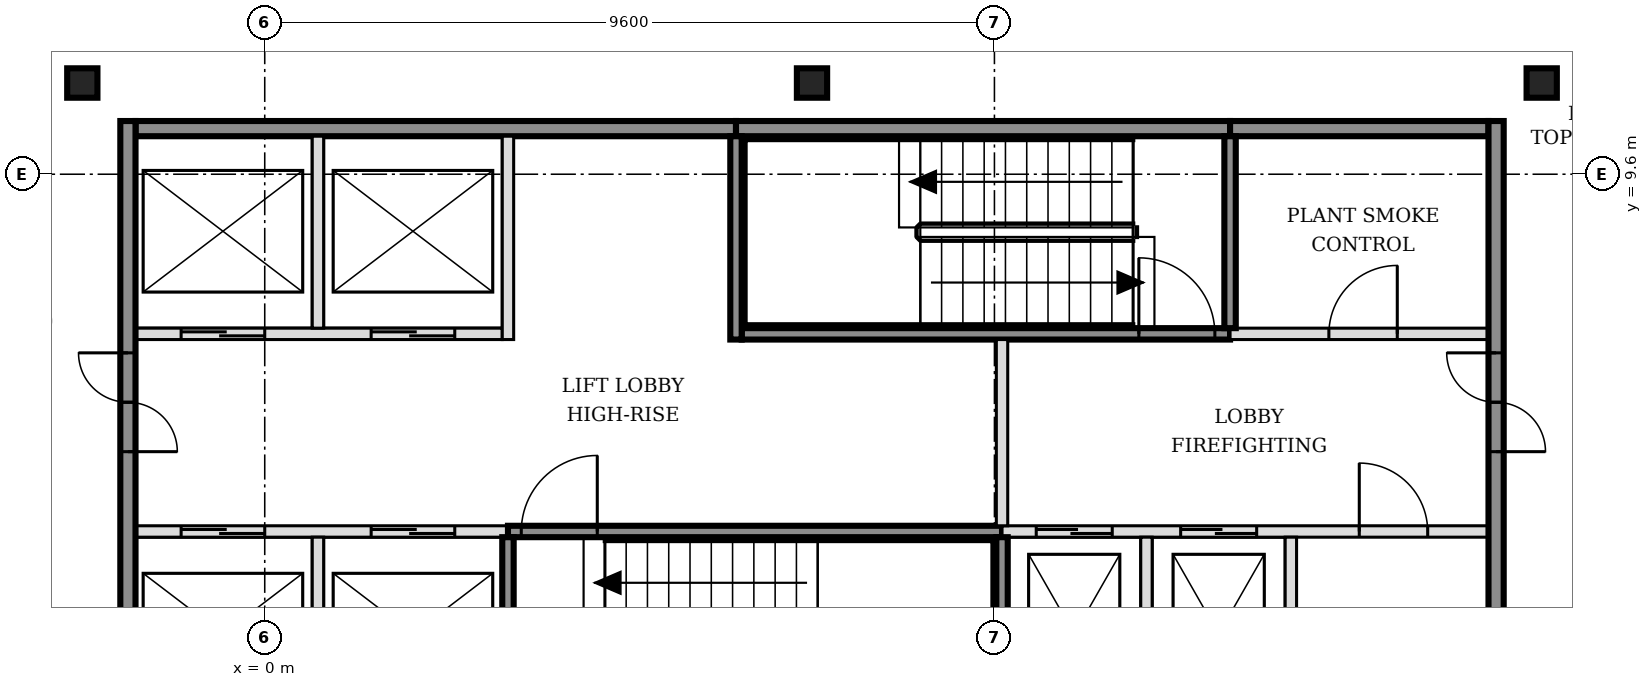
"""IFC4 building model, lengths in metres.
Left out: names, types, materials, properties, quantities, classifications, styles, units other than length and angle.
Written with IfcOpenShell. Run it as: python <this file> out.ifc"""

import sys

from ifc_helpers import new_model, si_unit, direction, frame, frame_2d, origin, origin_2d, place, context, subcontext, project, spatial, rectangle, i_section, extrude, element, fill, save


model = new_model("IFC4")
c1 = context("Model", 3, precision=1e-05, world=origin(), true_north=direction((0.0, 1.0)))
c2 = subcontext(c1, "Body", "Model", "MODEL_VIEW")
j1 = project(units=[si_unit("LENGTHUNIT", "METRE"), si_unit("PLANEANGLEUNIT", "RADIAN")], contexts=[c1])
p1 = place(None, origin())
s1 = spatial("IfcSite", under=j1, at=p1, CompositionType="ELEMENT")
p2 = place(p1, origin())
s2 = spatial("IfcBuilding", under=s1, at=p2, CompositionType="ELEMENT")
p3 = place(p2, frame((0.0, 0.0, 250.2)))
s3 = spatial("IfcBuildingStorey", under=s2, at=p3, CompositionType="ELEMENT", Elevation=250.2)
for number, where, z_axis, x_axis in (
    (1, (-2.4, 10.8, -0.15), (0.0, 0.0, 1.0), (1.0, 0.0, 0.0)),
    (2, (7.2, 10.8, -0.15), (0.0, 0.0, 1.0), (1.0, 0.0, 0.0)),
    (3, (16.8, 10.8, -0.15), (0.0, 0.0, 1.0), (1.0, 0.0, 0.0)),
):
    element("IfcColumn", number, at=place(p3, frame(where, z_axis=z_axis, x_axis=x_axis)), inside=s3, PredefinedType="COLUMN", context=c2, shape_type="SweptSolid", body=[
        extrude(i_section(OverallWidth=0.398, OverallDepth=0.387, WebThickness=0.021, FlangeThickness=0.033, FilletRadius=0.015, at=origin_2d()), origin(), (0.0, 0.0, 1.0), 3.6),
    ])
p4 = place(p3, frame((-1.7, 4.9, 0.0), z_axis=(0.0, 0.0, 1.0), x_axis=(1.0, 0.0, 0.0)))
e4 = element("IfcWall", 4, at=p4, inside=s3, PredefinedType="SOLIDWALL", context=c2, shape_type="SweptSolid", body=[
    extrude(rectangle(XDim=4.9, YDim=0.15, at=frame_2d((2.45, 0.0))), origin(), (0.0, 0.0, 1.0), 3.45),
])
p5 = place(p4, frame((0.6, 0.0, 0.0)))
e5 = element("IfcOpeningElement", 5, at=p5, cuts=e4, PredefinedType="OPENING", context=c2, shape_type="SweptSolid", body=[
    extrude(rectangle(XDim=1.1, YDim=2.1, at=frame_2d((0.55, 1.05))), frame((0.0, 0.085, 0.0), z_axis=(0.0, -1.0, 0.0), x_axis=(1.0, 0.0, 0.0)), (0.0, 0.0, 1.0), 0.17),
])
p6 = place(p4, frame((3.1, 0.0, 0.0)))
e6 = element("IfcOpeningElement", 6, at=p6, cuts=e4, PredefinedType="OPENING", context=c2, shape_type="SweptSolid", body=[
    extrude(rectangle(XDim=1.1, YDim=2.1, at=frame_2d((0.55, 1.05))), frame((0.0, 0.085, 0.0), z_axis=(0.0, -1.0, 0.0), x_axis=(1.0, 0.0, 0.0)), (0.0, 0.0, 1.0), 0.17),
])
p7 = place(p3, frame((3.2, 4.9, 0.0), z_axis=(0.0, 0.0, 1.0), x_axis=(1.0, 0.0, 0.0)))
e7 = element("IfcWall", 7, at=p7, inside=s3, PredefinedType="SOLIDWALL", context=c2, shape_type="SweptSolid", body=[
    extrude(rectangle(XDim=6.5, YDim=0.15, at=frame_2d((3.25, 0.0))), origin(), (0.0, 0.0, 1.0), 3.45),
])
p8 = place(p7, frame((0.175, 0.0, 0.0)))
e8 = element("IfcOpeningElement", 8, at=p8, cuts=e7, PredefinedType="OPENING", context=c2, shape_type="SweptSolid", body=[
    extrude(rectangle(XDim=1.0, YDim=2.1, at=frame_2d((0.5, 1.05))), frame((0.0, 0.085, 0.0), z_axis=(0.0, -1.0, 0.0), x_axis=(1.0, 0.0, 0.0)), (0.0, 0.0, 1.0), 0.17),
])
p9 = place(p3, frame((9.7, 4.9, 0.0), z_axis=(0.0, 0.0, 1.0), x_axis=(1.0, 0.0, 0.0)))
e9 = element("IfcWall", 9, at=p9, inside=s3, PredefinedType="SOLIDWALL", context=c2, shape_type="SweptSolid", body=[
    extrude(rectangle(XDim=6.4, YDim=0.15, at=frame_2d((3.2, 0.0))), origin(), (0.0, 0.0, 1.0), 3.45),
])
p10 = place(p9, frame((0.45, 0.0, 0.0)))
e10 = element("IfcOpeningElement", 10, at=p10, cuts=e9, PredefinedType="OPENING", context=c2, shape_type="SweptSolid", body=[
    extrude(rectangle(XDim=1.0, YDim=2.1, at=frame_2d((0.5, 1.05))), frame((0.0, 0.085, 0.0), z_axis=(0.0, -1.0, 0.0), x_axis=(1.0, 0.0, 0.0)), (0.0, 0.0, 1.0), 0.17),
])
p11 = place(p9, frame((2.35, 0.0, 0.0)))
e11 = element("IfcOpeningElement", 11, at=p11, cuts=e9, PredefinedType="OPENING", context=c2, shape_type="SweptSolid", body=[
    extrude(rectangle(XDim=1.0, YDim=2.1, at=frame_2d((0.5, 1.05))), frame((0.0, 0.085, 0.0), z_axis=(0.0, -1.0, 0.0), x_axis=(1.0, 0.0, 0.0)), (0.0, 0.0, 1.0), 0.17),
])
p12 = place(p9, frame((4.7, 0.0, 0.0)))
e12 = element("IfcOpeningElement", 12, at=p12, cuts=e9, PredefinedType="OPENING", context=c2, shape_type="SweptSolid", body=[
    extrude(rectangle(XDim=0.9, YDim=2.1, at=frame_2d((0.45, 1.05))), frame((0.0, 0.085, 0.0), z_axis=(0.0, -1.0, 0.0), x_axis=(1.0, 0.0, 0.0)), (0.0, 0.0, 1.0), 0.17),
])
p13 = place(p3, frame((-1.7, 7.5, 0.0), z_axis=(0.0, 0.0, 1.0), x_axis=(1.0, 0.0, 0.0)))
e13 = element("IfcWall", 13, at=p13, inside=s3, PredefinedType="SOLIDWALL", context=c2, shape_type="SweptSolid", body=[
    extrude(rectangle(XDim=4.825, YDim=0.15, at=frame_2d((2.413, 0.0))), origin(), (0.0, 0.0, 1.0), 3.45),
])
p14 = place(p13, frame((0.6, 0.0, 0.0)))
e14 = element("IfcOpeningElement", 14, at=p14, cuts=e13, PredefinedType="OPENING", context=c2, shape_type="SweptSolid", body=[
    extrude(rectangle(XDim=1.1, YDim=2.1, at=frame_2d((0.55, 1.05))), frame((0.0, 0.085, 0.0), z_axis=(0.0, -1.0, 0.0), x_axis=(1.0, 0.0, 0.0)), (0.0, 0.0, 1.0), 0.17),
])
p15 = place(p13, frame((3.1, 0.0, 0.0)))
e15 = element("IfcOpeningElement", 15, at=p15, cuts=e13, PredefinedType="OPENING", context=c2, shape_type="SweptSolid", body=[
    extrude(rectangle(XDim=1.1, YDim=2.1, at=frame_2d((0.55, 1.05))), frame((0.0, 0.085, 0.0), z_axis=(0.0, -1.0, 0.0), x_axis=(1.0, 0.0, 0.0)), (0.0, 0.0, 1.0), 0.17),
])
p16 = place(p3, frame((6.275, 7.5, 0.0), z_axis=(0.0, 0.0, 1.0), x_axis=(1.0, 0.0, 0.0)))
e16 = element("IfcWall", 16, at=p16, inside=s3, PredefinedType="SOLIDWALL", context=c2, shape_type="SweptSolid", body=[
    extrude(rectangle(XDim=6.425, YDim=0.15, at=frame_2d((3.212, 0.0))), origin(), (0.0, 0.0, 1.0), 3.45),
])
p17 = place(p16, frame((5.225, 0.0, 0.0)))
e17 = element("IfcOpeningElement", 17, at=p17, cuts=e16, PredefinedType="OPENING", context=c2, shape_type="SweptSolid", body=[
    extrude(rectangle(XDim=1.0, YDim=2.1, at=frame_2d((0.5, 1.05))), frame((0.0, 0.085, 0.0), z_axis=(0.0, -1.0, 0.0), x_axis=(1.0, 0.0, 0.0)), (0.0, 0.0, 1.0), 0.17),
])
p18 = place(p3, frame((12.7, 7.5, 0.0), z_axis=(0.0, 0.0, 1.0), x_axis=(1.0, 0.0, 0.0)))
e18 = element("IfcWall", 18, at=p18, inside=s3, PredefinedType="SOLIDWALL", context=c2, shape_type="SweptSolid", body=[
    extrude(rectangle(XDim=3.4, YDim=0.15, at=frame_2d((1.7, 0.0))), origin(), (0.0, 0.0, 1.0), 3.45),
])
p19 = place(p18, frame((1.3, 0.0, 0.0)))
e19 = element("IfcOpeningElement", 19, at=p19, cuts=e18, PredefinedType="OPENING", context=c2, shape_type="SweptSolid", body=[
    extrude(rectangle(XDim=0.9, YDim=2.1, at=frame_2d((0.45, 1.05))), frame((0.0, 0.085, 0.0), z_axis=(0.0, -1.0, 0.0), x_axis=(1.0, 0.0, 0.0)), (0.0, 0.0, 1.0), 0.17),
])
p20 = place(p3, frame((-1.7, 10.2, 0.0), z_axis=(0.0, 0.0, 1.0), x_axis=(1.0, 0.0, 0.0)))
e20 = element("IfcWall", 20, at=p20, inside=s3, PredefinedType="SOLIDWALL", context=c2, shape_type="SweptSolid", body=[
    extrude(rectangle(XDim=7.9, YDim=0.2, at=frame_2d((3.95, 0.0))), origin(), (0.0, 0.0, 1.0), 3.45),
])
p21 = place(p3, frame((6.2, 10.2, 0.0), z_axis=(0.0, 0.0, 1.0), x_axis=(1.0, 0.0, 0.0)))
e21 = element("IfcWall", 21, at=p21, inside=s3, PredefinedType="SOLIDWALL", context=c2, shape_type="SweptSolid", body=[
    extrude(rectangle(XDim=6.5, YDim=0.2, at=frame_2d((3.25, 0.0))), origin(), (0.0, 0.0, 1.0), 3.45),
])
p22 = place(p3, frame((12.7, 10.2, 0.0), z_axis=(0.0, 0.0, 1.0), x_axis=(1.0, 0.0, 0.0)))
e22 = element("IfcWall", 22, at=p22, inside=s3, PredefinedType="SOLIDWALL", context=c2, shape_type="SweptSolid", body=[
    extrude(rectangle(XDim=3.4, YDim=0.2, at=frame_2d((1.7, 0.0))), origin(), (0.0, 0.0, 1.0), 3.45),
])
p23 = place(p3, frame((-1.8, -5.5, 0.0), z_axis=(0.0, 0.0, 1.0), x_axis=(0.0, 1.0, 0.0)))
e23 = element("IfcWall", 23, at=p23, inside=s3, PredefinedType="SOLIDWALL", context=c2, shape_type="SweptSolid", body=[
    extrude(rectangle(XDim=15.8, YDim=0.2, at=frame_2d((7.9, 0.0))), origin(), (0.0, 0.0, 1.0), 3.45),
])
p24 = place(p23, frame((3.05, 0.0, 0.0)))
e24 = element("IfcOpeningElement", 24, at=p24, cuts=e23, PredefinedType="OPENING", context=c2, shape_type="SweptSolid", body=[
    extrude(rectangle(XDim=1.3, YDim=2.1, at=frame_2d((0.65, 1.05))), frame((0.0, 0.11, 0.0), z_axis=(0.0, -1.0, 0.0), x_axis=(1.0, 0.0, 0.0)), (0.0, 0.0, 1.0), 0.22),
])
p25 = place(p23, frame((11.45, 0.0, 0.0)))
e25 = element("IfcOpeningElement", 25, at=p25, cuts=e23, PredefinedType="OPENING", context=c2, shape_type="SweptSolid", body=[
    extrude(rectangle(XDim=1.3, YDim=2.1, at=frame_2d((0.65, 1.05))), frame((0.0, 0.11, 0.0), z_axis=(0.0, -1.0, 0.0), x_axis=(1.0, 0.0, 0.0)), (0.0, 0.0, 1.0), 0.22),
])
p26 = place(p3, frame((0.7, 2.275, 0.0), z_axis=(0.0, 0.0, 1.0), x_axis=(0.0, 1.0, 0.0)))
e26 = element("IfcWall", 26, at=p26, inside=s3, PredefinedType="SOLIDWALL", context=c2, shape_type="SweptSolid", body=[
    extrude(rectangle(XDim=2.55, YDim=0.15, at=frame_2d((1.275, 0.0))), origin(), (0.0, 0.0, 1.0), 3.45),
])
p27 = place(p3, frame((0.7, 7.575, 0.0), z_axis=(0.0, 0.0, 1.0), x_axis=(0.0, 1.0, 0.0)))
e27 = element("IfcWall", 27, at=p27, inside=s3, PredefinedType="SOLIDWALL", context=c2, shape_type="SweptSolid", body=[
    extrude(rectangle(XDim=2.525, YDim=0.15, at=frame_2d((1.263, 0.0))), origin(), (0.0, 0.0, 1.0), 3.45),
])
p28 = place(p3, frame((3.2, 2.275, 0.0), z_axis=(0.0, 0.0, 1.0), x_axis=(0.0, 1.0, 0.0)))
e28 = element("IfcWall", 28, at=p28, inside=s3, PredefinedType="SOLIDWALL", context=c2, shape_type="SweptSolid", body=[
    extrude(rectangle(XDim=2.55, YDim=0.15, at=frame_2d((1.275, 0.0))), origin(), (0.0, 0.0, 1.0), 3.45),
])
for number, where, z_axis, x_axis in (
    (29, (3.2, 7.425, 0.0), (0.0, 0.0, 1.0), (0.0, 1.0, 0.0)),
    (30, (6.2, 7.425, 0.0), (0.0, 0.0, 1.0), (0.0, 1.0, 0.0)),
):
    element("IfcWall", number, at=place(p3, frame(where, z_axis=z_axis, x_axis=x_axis)), inside=s3, PredefinedType="SOLIDWALL", context=c2, shape_type="SweptSolid", body=[
        extrude(rectangle(XDim=2.675, YDim=0.15, at=frame_2d((1.337, 0.0))), origin(), (0.0, 0.0, 1.0), 3.45),
    ])
p29 = place(p3, frame((9.7, 2.275, 0.0), z_axis=(0.0, 0.0, 1.0), x_axis=(0.0, 1.0, 0.0)))
e31 = element("IfcWall", 31, at=p29, inside=s3, PredefinedType="SOLIDWALL", context=c2, shape_type="SweptSolid", body=[
    extrude(rectangle(XDim=2.55, YDim=0.15, at=frame_2d((1.275, 0.0))), origin(), (0.0, 0.0, 1.0), 3.45),
])
p30 = place(p3, frame((9.7, 4.975, 0.0), z_axis=(0.0, 0.0, 1.0), x_axis=(0.0, 1.0, 0.0)))
e32 = element("IfcWall", 32, at=p30, inside=s3, PredefinedType="SOLIDWALL", context=c2, shape_type="SweptSolid", body=[
    extrude(rectangle(XDim=2.45, YDim=0.15, at=frame_2d((1.225, 0.0))), origin(), (0.0, 0.0, 1.0), 3.45),
])
p31 = place(p3, frame((11.6, 2.275, 0.0), z_axis=(0.0, 0.0, 1.0), x_axis=(0.0, 1.0, 0.0)))
e33 = element("IfcWall", 33, at=p31, inside=s3, PredefinedType="SOLIDWALL", context=c2, shape_type="SweptSolid", body=[
    extrude(rectangle(XDim=2.55, YDim=0.15, at=frame_2d((1.275, 0.0))), origin(), (0.0, 0.0, 1.0), 3.45),
])
p32 = place(p3, frame((12.7, 7.575, 0.0), z_axis=(0.0, 0.0, 1.0), x_axis=(0.0, 1.0, 0.0)))
e34 = element("IfcWall", 34, at=p32, inside=s3, PredefinedType="SOLIDWALL", context=c2, shape_type="SweptSolid", body=[
    extrude(rectangle(XDim=2.525, YDim=0.15, at=frame_2d((1.263, 0.0))), origin(), (0.0, 0.0, 1.0), 3.45),
])
p33 = place(p3, frame((13.5, 2.275, 0.0), z_axis=(0.0, 0.0, 1.0), x_axis=(0.0, 1.0, 0.0)))
e35 = element("IfcWall", 35, at=p33, inside=s3, PredefinedType="SOLIDWALL", context=c2, shape_type="SweptSolid", body=[
    extrude(rectangle(XDim=2.55, YDim=0.15, at=frame_2d((1.275, 0.0))), origin(), (0.0, 0.0, 1.0), 3.45),
])
p34 = place(p3, frame((16.2, -5.5, 0.0), z_axis=(0.0, 0.0, 1.0), x_axis=(0.0, 1.0, 0.0)))
e36 = element("IfcWall", 36, at=p34, inside=s3, PredefinedType="SOLIDWALL", context=c2, shape_type="SweptSolid", body=[
    extrude(rectangle(XDim=15.8, YDim=0.2, at=frame_2d((7.9, 0.0))), origin(), (0.0, 0.0, 1.0), 3.45),
])
p35 = place(p34, frame((3.05, 0.0, 0.0)))
e37 = element("IfcOpeningElement", 37, at=p35, cuts=e36, PredefinedType="OPENING", context=c2, shape_type="SweptSolid", body=[
    extrude(rectangle(XDim=1.3, YDim=2.1, at=frame_2d((0.65, 1.05))), frame((0.0, 0.11, 0.0), z_axis=(0.0, -1.0, 0.0), x_axis=(1.0, 0.0, 0.0)), (0.0, 0.0, 1.0), 0.22),
])
p36 = place(p34, frame((11.45, 0.0, 0.0)))
e38 = element("IfcOpeningElement", 38, at=p36, cuts=e36, PredefinedType="OPENING", context=c2, shape_type="SweptSolid", body=[
    extrude(rectangle(XDim=1.3, YDim=2.1, at=frame_2d((0.65, 1.05))), frame((0.0, 0.11, 0.0), z_axis=(0.0, -1.0, 0.0), x_axis=(1.0, 0.0, 0.0)), (0.0, 0.0, 1.0), 0.22),
])
p37 = place(p5, origin())
e39 = element("IfcDoor", 39, at=p37, inside=s3, OperationType="DOUBLE_DOOR_SLIDING", PredefinedType="DOOR", context=c2, shape_type="SweptSolid", body=[
    extrude(rectangle(XDim=1.1, YDim=2.1, at=frame_2d((0.55, 1.05))), frame((0.0, 0.025, 0.0), z_axis=(0.0, -1.0, 0.0), x_axis=(1.0, 0.0, 0.0)), (0.0, 0.0, 1.0), 0.05),
])
fill(e5, e39)
p38 = place(p6, origin())
e40 = element("IfcDoor", 40, at=p38, inside=s3, OperationType="DOUBLE_DOOR_SLIDING", PredefinedType="DOOR", context=c2, shape_type="SweptSolid", body=[
    extrude(rectangle(XDim=1.1, YDim=2.1, at=frame_2d((0.55, 1.05))), frame((0.0, 0.025, 0.0), z_axis=(0.0, -1.0, 0.0), x_axis=(1.0, 0.0, 0.0)), (0.0, 0.0, 1.0), 0.05),
])
fill(e6, e40)
p39 = place(p14, origin())
e41 = element("IfcDoor", 41, at=p39, inside=s3, OperationType="DOUBLE_DOOR_SLIDING", PredefinedType="DOOR", context=c2, shape_type="SweptSolid", body=[
    extrude(rectangle(XDim=1.1, YDim=2.1, at=frame_2d((0.55, 1.05))), frame((0.0, 0.025, 0.0), z_axis=(0.0, -1.0, 0.0), x_axis=(1.0, 0.0, 0.0)), (0.0, 0.0, 1.0), 0.05),
])
fill(e14, e41)
p40 = place(p15, origin())
e42 = element("IfcDoor", 42, at=p40, inside=s3, OperationType="DOUBLE_DOOR_SLIDING", PredefinedType="DOOR", context=c2, shape_type="SweptSolid", body=[
    extrude(rectangle(XDim=1.1, YDim=2.1, at=frame_2d((0.55, 1.05))), frame((0.0, 0.025, 0.0), z_axis=(0.0, -1.0, 0.0), x_axis=(1.0, 0.0, 0.0)), (0.0, 0.0, 1.0), 0.05),
])
fill(e15, e42)
p41 = place(p10, origin())
e43 = element("IfcDoor", 43, at=p41, inside=s3, OperationType="DOUBLE_DOOR_SLIDING", PredefinedType="DOOR", context=c2, shape_type="SweptSolid", body=[
    extrude(rectangle(XDim=1.0, YDim=2.1, at=frame_2d((0.5, 1.05))), frame((0.0, 0.025, 0.0), z_axis=(0.0, -1.0, 0.0), x_axis=(1.0, 0.0, 0.0)), (0.0, 0.0, 1.0), 0.05),
])
fill(e10, e43)
p42 = place(p11, origin())
e44 = element("IfcDoor", 44, at=p42, inside=s3, OperationType="DOUBLE_DOOR_SLIDING", PredefinedType="DOOR", context=c2, shape_type="SweptSolid", body=[
    extrude(rectangle(XDim=1.0, YDim=2.1, at=frame_2d((0.5, 1.05))), frame((0.0, 0.025, 0.0), z_axis=(0.0, -1.0, 0.0), x_axis=(1.0, 0.0, 0.0)), (0.0, 0.0, 1.0), 0.05),
])
fill(e11, e44)
p43 = place(p8, origin())
e45 = element("IfcDoor", 45, at=p43, inside=s3, OperationType="SINGLE_SWING_RIGHT", PredefinedType="DOOR", context=c2, shape_type="SweptSolid", body=[
    extrude(rectangle(XDim=1.0, YDim=2.1, at=frame_2d((0.5, 1.05))), frame((0.0, 0.025, 0.0), z_axis=(0.0, -1.0, 0.0), x_axis=(1.0, 0.0, 0.0)), (0.0, 0.0, 1.0), 0.05),
])
fill(e8, e45)
p44 = place(p17, origin())
e46 = element("IfcDoor", 46, at=p44, inside=s3, OperationType="SINGLE_SWING_LEFT", PredefinedType="DOOR", context=c2, shape_type="SweptSolid", body=[
    extrude(rectangle(XDim=1.0, YDim=2.1, at=frame_2d((0.5, 1.05))), frame((0.0, 0.025, 0.0), z_axis=(0.0, -1.0, 0.0), x_axis=(1.0, 0.0, 0.0)), (0.0, 0.0, 1.0), 0.05),
])
fill(e17, e46)
p45 = place(p25, origin())
e47 = element("IfcDoor", 47, at=p45, inside=s3, OperationType="DOUBLE_DOOR_SINGLE_SWING", PredefinedType="DOOR", context=c2, shape_type="SweptSolid", body=[
    extrude(rectangle(XDim=1.3, YDim=2.1, at=frame_2d((0.65, 1.05))), frame((0.0, 0.025, 0.0), z_axis=(0.0, -1.0, 0.0), x_axis=(1.0, 0.0, 0.0)), (0.0, 0.0, 1.0), 0.05),
])
fill(e25, e47)
p46 = place(p36, origin())
e48 = element("IfcDoor", 48, at=p46, inside=s3, OperationType="DOUBLE_DOOR_SINGLE_SWING", PredefinedType="DOOR", context=c2, shape_type="SweptSolid", body=[
    extrude(rectangle(XDim=1.3, YDim=2.1, at=frame_2d((0.65, 1.05))), frame((0.0, 0.025, 0.0), z_axis=(0.0, -1.0, 0.0), x_axis=(1.0, 0.0, 0.0)), (0.0, 0.0, 1.0), 0.05),
])
fill(e38, e48)
p47 = place(p12, origin())
e49 = element("IfcDoor", 49, at=p47, inside=s3, OperationType="SINGLE_SWING_LEFT", PredefinedType="DOOR", context=c2, shape_type="SweptSolid", body=[
    extrude(rectangle(XDim=0.9, YDim=2.1, at=frame_2d((0.45, 1.05))), frame((0.0, 0.025, 0.0), z_axis=(0.0, -1.0, 0.0), x_axis=(1.0, 0.0, 0.0)), (0.0, 0.0, 1.0), 0.05),
])
fill(e12, e49)
p48 = place(p19, origin())
e50 = element("IfcDoor", 50, at=p48, inside=s3, OperationType="SINGLE_SWING_RIGHT", PredefinedType="DOOR", context=c2, shape_type="SweptSolid", body=[
    extrude(rectangle(XDim=0.9, YDim=2.1, at=frame_2d((0.45, 1.05))), frame((0.0, 0.025, 0.0), z_axis=(0.0, -1.0, 0.0), x_axis=(1.0, 0.0, 0.0)), (0.0, 0.0, 1.0), 0.05),
])
fill(e19, e50)
save(model, sys.argv[1])
